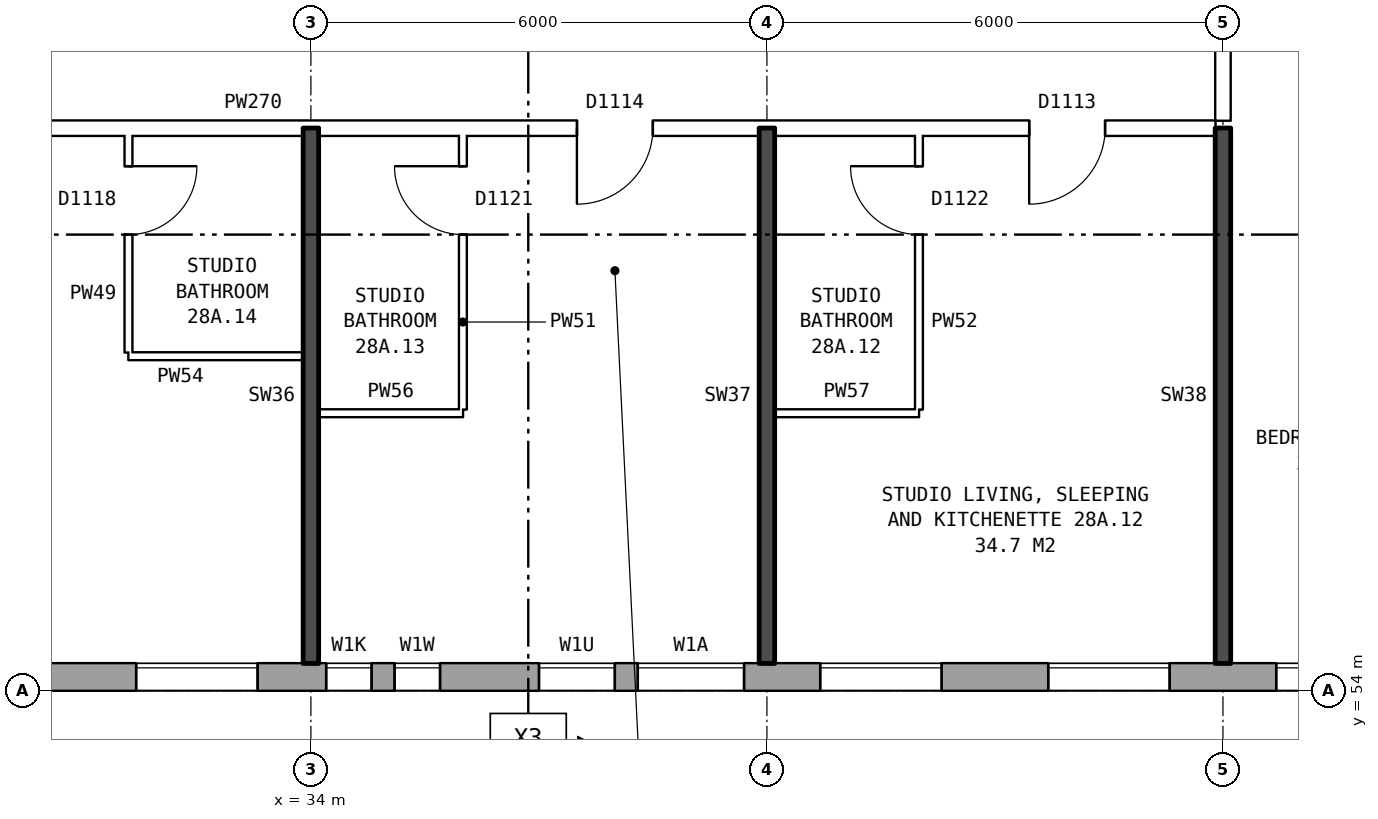
"""IFC4 building model, lengths in metres.
Left out: names, types, materials, properties, quantities, classifications, styles, units other than length and angle.
Written with IfcOpenShell. Run it as: python <this file> out.ifc"""

import sys

from ifc_helpers import new_model, si_unit, direction, frame, frame_2d, origin, place, context, subcontext, project, spatial, rectangle, extrude, element, fill, save


model = new_model("IFC4")
c1 = context("Model", 3, precision=1e-05, world=origin(), true_north=direction((0.0, 1.0)))
c2 = subcontext(c1, "Body", "Model", "MODEL_VIEW")
j1 = project(units=[si_unit("LENGTHUNIT", "METRE"), si_unit("PLANEANGLEUNIT", "RADIAN")], contexts=[c1])
p1 = place(None, origin())
s1 = spatial("IfcSite", under=j1, at=p1, CompositionType="ELEMENT")
p2 = place(p1, origin())
s2 = spatial("IfcBuilding", under=s1, at=p2, CompositionType="ELEMENT")
p3 = place(p2, frame((0.0, 0.0, 102.6)))
s3 = spatial("IfcBuildingStorey", under=s2, at=p3, CompositionType="ELEMENT", Elevation=102.6)
p4 = place(p3, frame((28.075, 54.18, 0.0), z_axis=(0.0, 0.0, 1.0), x_axis=(1.0, 0.0, 0.0)))
e1 = element("IfcWall", 1, at=p4, inside=s3, PredefinedType="STANDARD", context=c2, shape_type="SweptSolid", body=[
    extrude(rectangle(XDim=44.851, YDim=0.36, at=frame_2d((22.425, 0.0))), origin(), (0.0, 0.0, 1.0), 2.85),
])
p5 = place(p4, frame((0.625, 0.0, 0.8)))
e2 = element("IfcOpeningElement", 2, at=p5, cuts=e1, PredefinedType="OPENING", context=c2, shape_type="SweptSolid", body=[
    extrude(rectangle(XDim=1.6, YDim=1.8, at=frame_2d((0.8, 0.9))), frame((0.0, 0.19, 0.0), z_axis=(0.0, -1.0, 0.0), x_axis=(1.0, 0.0, 0.0)), (0.0, 0.0, 1.0), 0.38),
])
p6 = place(p4, frame((3.625, 0.0, 0.8)))
e3 = element("IfcOpeningElement", 3, at=p6, cuts=e1, PredefinedType="OPENING", context=c2, shape_type="SweptSolid", body=[
    extrude(rectangle(XDim=1.6, YDim=1.8, at=frame_2d((0.8, 0.9))), frame((0.0, 0.19, 0.0), z_axis=(0.0, -1.0, 0.0), x_axis=(1.0, 0.0, 0.0)), (0.0, 0.0, 1.0), 0.38),
])
p7 = place(p4, frame((6.125, 0.0, 1.0)))
e4 = element("IfcOpeningElement", 4, at=p7, cuts=e1, PredefinedType="OPENING", context=c2, shape_type="SweptSolid", body=[
    extrude(rectangle(XDim=0.6, YDim=1.5, at=frame_2d((0.3, 0.75))), frame((0.0, 0.19, 0.0), z_axis=(0.0, -1.0, 0.0), x_axis=(1.0, 0.0, 0.0)), (0.0, 0.0, 1.0), 0.38),
])
p8 = place(p4, frame((7.025, 0.0, 1.7)))
e5 = element("IfcOpeningElement", 5, at=p8, cuts=e1, PredefinedType="OPENING", context=c2, shape_type="SweptSolid", body=[
    extrude(rectangle(XDim=0.6, YDim=0.9, at=frame_2d((0.3, 0.45))), frame((0.0, 0.19, 0.0), z_axis=(0.0, -1.0, 0.0), x_axis=(1.0, 0.0, 0.0)), (0.0, 0.0, 1.0), 0.38),
])
p9 = place(p4, frame((12.625, 0.0, 0.8)))
e6 = element("IfcOpeningElement", 6, at=p9, cuts=e1, PredefinedType="OPENING", context=c2, shape_type="SweptSolid", body=[
    extrude(rectangle(XDim=1.6, YDim=1.8, at=frame_2d((0.8, 0.9))), frame((0.0, 0.19, 0.0), z_axis=(0.0, -1.0, 0.0), x_axis=(1.0, 0.0, 0.0)), (0.0, 0.0, 1.0), 0.38),
])
p10 = place(p4, frame((15.625, 0.0, 0.8)))
e7 = element("IfcOpeningElement", 7, at=p10, cuts=e1, PredefinedType="OPENING", context=c2, shape_type="SweptSolid", body=[
    extrude(rectangle(XDim=1.6, YDim=1.8, at=frame_2d((0.8, 0.9))), frame((0.0, 0.19, 0.0), z_axis=(0.0, -1.0, 0.0), x_axis=(1.0, 0.0, 0.0)), (0.0, 0.0, 1.0), 0.38),
])
p11 = place(p4, frame((18.625, 0.0, 0.8)))
e8 = element("IfcOpeningElement", 8, at=p11, cuts=e1, PredefinedType="OPENING", context=c2, shape_type="SweptSolid", body=[
    extrude(rectangle(XDim=1.6, YDim=1.8, at=frame_2d((0.8, 0.9))), frame((0.0, 0.19, 0.0), z_axis=(0.0, -1.0, 0.0), x_axis=(1.0, 0.0, 0.0)), (0.0, 0.0, 1.0), 0.38),
])
p12 = place(p4, frame((21.625, 0.0, 0.8)))
e9 = element("IfcOpeningElement", 9, at=p12, cuts=e1, PredefinedType="OPENING", context=c2, shape_type="SweptSolid", body=[
    extrude(rectangle(XDim=1.6, YDim=1.8, at=frame_2d((0.8, 0.9))), frame((0.0, 0.19, 0.0), z_axis=(0.0, -1.0, 0.0), x_axis=(1.0, 0.0, 0.0)), (0.0, 0.0, 1.0), 0.38),
])
p13 = place(p4, frame((24.625, 0.0, 0.8)))
e10 = element("IfcOpeningElement", 10, at=p13, cuts=e1, PredefinedType="OPENING", context=c2, shape_type="SweptSolid", body=[
    extrude(rectangle(XDim=1.6, YDim=1.8, at=frame_2d((0.8, 0.9))), frame((0.0, 0.19, 0.0), z_axis=(0.0, -1.0, 0.0), x_axis=(1.0, 0.0, 0.0)), (0.0, 0.0, 1.0), 0.38),
])
p14 = place(p4, frame((27.625, 0.0, 0.8)))
e11 = element("IfcOpeningElement", 11, at=p14, cuts=e1, PredefinedType="OPENING", context=c2, shape_type="SweptSolid", body=[
    extrude(rectangle(XDim=1.6, YDim=1.8, at=frame_2d((0.8, 0.9))), frame((0.0, 0.19, 0.0), z_axis=(0.0, -1.0, 0.0), x_axis=(1.0, 0.0, 0.0)), (0.0, 0.0, 1.0), 0.38),
])
p15 = place(p4, frame((30.625, 0.0, 0.8)))
e12 = element("IfcOpeningElement", 12, at=p15, cuts=e1, PredefinedType="OPENING", context=c2, shape_type="SweptSolid", body=[
    extrude(rectangle(XDim=1.6, YDim=1.8, at=frame_2d((0.8, 0.9))), frame((0.0, 0.19, 0.0), z_axis=(0.0, -1.0, 0.0), x_axis=(1.0, 0.0, 0.0)), (0.0, 0.0, 1.0), 0.38),
])
p16 = place(p4, frame((33.075, 0.0, 0.8)))
e13 = element("IfcOpeningElement", 13, at=p16, cuts=e1, PredefinedType="OPENING", context=c2, shape_type="SweptSolid", body=[
    extrude(rectangle(XDim=1.6, YDim=1.8, at=frame_2d((0.8, 0.9))), frame((0.0, 0.19, 0.0), z_axis=(0.0, -1.0, 0.0), x_axis=(1.0, 0.0, 0.0)), (0.0, 0.0, 1.0), 0.38),
])
p17 = place(p4, frame((37.175, 0.0, 1.7)))
e14 = element("IfcOpeningElement", 14, at=p17, cuts=e1, PredefinedType="OPENING", context=c2, shape_type="SweptSolid", body=[
    extrude(rectangle(XDim=1.0, YDim=0.9, at=frame_2d((0.5, 0.45))), frame((0.0, 0.19, 0.0), z_axis=(0.0, -1.0, 0.0), x_axis=(1.0, 0.0, 0.0)), (0.0, 0.0, 1.0), 0.38),
])
p18 = place(p4, frame((39.625, 0.0, 0.8)))
e15 = element("IfcOpeningElement", 15, at=p18, cuts=e1, PredefinedType="OPENING", context=c2, shape_type="SweptSolid", body=[
    extrude(rectangle(XDim=1.6, YDim=1.8, at=frame_2d((0.8, 0.9))), frame((0.0, 0.19, 0.0), z_axis=(0.0, -1.0, 0.0), x_axis=(1.0, 0.0, 0.0)), (0.0, 0.0, 1.0), 0.38),
])
p19 = place(p4, frame((42.625, 0.0, 0.8)))
e16 = element("IfcOpeningElement", 16, at=p19, cuts=e1, PredefinedType="OPENING", context=c2, shape_type="SweptSolid", body=[
    extrude(rectangle(XDim=1.6, YDim=1.8, at=frame_2d((0.8, 0.9))), frame((0.0, 0.19, 0.0), z_axis=(0.0, -1.0, 0.0), x_axis=(1.0, 0.0, 0.0)), (0.0, 0.0, 1.0), 0.38),
])
p20 = place(p4, frame((8.925, 0.0, 0.8)))
e17 = element("IfcOpeningElement", 17, at=p20, cuts=e1, PredefinedType="OPENING", context=c2, shape_type="SweptSolid", body=[
    extrude(rectangle(XDim=1.0, YDim=0.9, at=frame_2d((0.5, 0.45))), frame((0.0, 0.19, 0.0), z_axis=(0.0, -1.0, 0.0), x_axis=(1.0, 0.0, 0.0)), (0.0, 0.0, 1.0), 0.38),
])
p21 = place(p4, frame((10.225, 0.0, 0.8)))
e18 = element("IfcOpeningElement", 18, at=p21, cuts=e1, PredefinedType="OPENING", context=c2, shape_type="SweptSolid", body=[
    extrude(rectangle(XDim=1.4, YDim=1.8, at=frame_2d((0.7, 0.9))), frame((0.0, 0.19, 0.0), z_axis=(0.0, -1.0, 0.0), x_axis=(1.0, 0.0, 0.0)), (0.0, 0.0, 1.0), 0.38),
])
p22 = place(p4, frame((34.975, 0.0, 0.8)))
e19 = element("IfcOpeningElement", 19, at=p22, cuts=e1, PredefinedType="OPENING", context=c2, shape_type="SweptSolid", body=[
    extrude(rectangle(XDim=0.6, YDim=0.9, at=frame_2d((0.3, 0.45))), frame((0.0, 0.19, 0.0), z_axis=(0.0, -1.0, 0.0), x_axis=(1.0, 0.0, 0.0)), (0.0, 0.0, 1.0), 0.38),
])
p23 = place(p4, frame((38.475, 0.0, 0.8)))
e20 = element("IfcOpeningElement", 20, at=p23, cuts=e1, PredefinedType="OPENING", context=c2, shape_type="SweptSolid", body=[
    extrude(rectangle(XDim=0.8, YDim=1.8, at=frame_2d((0.4, 0.9))), frame((0.0, 0.19, 0.0), z_axis=(0.0, -1.0, 0.0), x_axis=(1.0, 0.0, 0.0)), (0.0, 0.0, 1.0), 0.38),
])
for number, where, z_axis, x_axis in (
    (21, (34.1, 57.65, 0.0), (0.0, 0.0, 1.0), (1.0, 0.0, 0.0)),
    (22, (40.1, 57.65, 0.0), (0.0, 0.0, 1.0), (1.0, 0.0, 0.0)),
):
    element("IfcWall", number, at=place(p3, frame(where, z_axis=z_axis, x_axis=x_axis)), inside=s3, PredefinedType="PARTITIONING", context=c2, shape_type="SweptSolid", body=[
        extrude(rectangle(XDim=1.9, YDim=0.1, at=frame_2d((0.95, 0.0))), origin(), (0.0, 0.0, 1.0), 2.85),
    ])
p24 = place(p3, frame((31.6, 58.4, 0.0), z_axis=(0.0, 0.0, 1.0), x_axis=(1.0, 0.0, 0.0)))
e23 = element("IfcWall", 23, at=p24, inside=s3, PredefinedType="PARTITIONING", context=c2, shape_type="SweptSolid", body=[
    extrude(rectangle(XDim=2.3, YDim=0.1, at=frame_2d((1.15, 0.0))), origin(), (0.0, 0.0, 1.0), 2.85),
])
p25 = place(p3, frame((25.36, 61.4, 0.0), z_axis=(0.0, 0.0, 1.0), x_axis=(1.0, 0.0, 0.0)))
e24 = element("IfcWall", 24, at=p25, inside=s3, PredefinedType="PARTITIONING", context=c2, shape_type="SweptSolid", body=[
    extrude(rectangle(XDim=20.54, YDim=0.2, at=frame_2d((10.27, 0.0))), origin(), (0.0, 0.0, 1.0), 2.85),
])
p26 = place(p25, frame((18.09, 0.0, 0.0)))
e25 = element("IfcOpeningElement", 25, at=p26, cuts=e24, PredefinedType="OPENING", context=c2, shape_type="SweptSolid", body=[
    extrude(rectangle(XDim=1.0, YDim=2.1, at=frame_2d((0.5, 1.05))), frame((0.0, 0.11, 0.0), z_axis=(0.0, -1.0, 0.0), x_axis=(1.0, 0.0, 0.0)), (0.0, 0.0, 1.0), 0.22),
])
p27 = place(p25, frame((12.14, 0.0, 0.0)))
e26 = element("IfcOpeningElement", 26, at=p27, cuts=e24, PredefinedType="OPENING", context=c2, shape_type="SweptSolid", body=[
    extrude(rectangle(XDim=1.0, YDim=2.1, at=frame_2d((0.5, 1.05))), frame((0.0, 0.11, 0.0), z_axis=(0.0, -1.0, 0.0), x_axis=(1.0, 0.0, 0.0)), (0.0, 0.0, 1.0), 0.22),
])
p28 = place(p25, frame((2.62, 0.0, 0.0)))
e27 = element("IfcOpeningElement", 27, at=p28, cuts=e24, PredefinedType="OPENING", context=c2, shape_type="SweptSolid", body=[
    extrude(rectangle(XDim=1.0, YDim=2.1, at=frame_2d((0.5, 1.05))), frame((0.0, 0.11, 0.0), z_axis=(0.0, -1.0, 0.0), x_axis=(1.0, 0.0, 0.0)), (0.0, 0.0, 1.0), 0.22),
])
p29 = place(p3, frame((31.6, 58.45, 0.0), z_axis=(0.0, 0.0, 1.0), x_axis=(0.0, 1.0, 0.0)))
e28 = element("IfcWall", 28, at=p29, inside=s3, PredefinedType="PARTITIONING", context=c2, shape_type="SweptSolid", body=[
    extrude(rectangle(XDim=2.85, YDim=0.1, at=frame_2d((1.425, 0.0))), origin(), (0.0, 0.0, 1.0), 2.85),
])
p30 = place(p29, frame((1.55, 0.0, 0.0)))
e29 = element("IfcOpeningElement", 29, at=p30, cuts=e28, PredefinedType="OPENING", context=c2, shape_type="SweptSolid", body=[
    extrude(rectangle(XDim=0.9, YDim=2.1, at=frame_2d((0.45, 1.05))), frame((0.0, 0.06, 0.0), z_axis=(0.0, -1.0, 0.0), x_axis=(1.0, 0.0, 0.0)), (0.0, 0.0, 1.0), 0.12),
])
p31 = place(p3, frame((34.0, 54.36, 0.0), z_axis=(0.0, 0.0, 1.0), x_axis=(0.0, 1.0, 0.0)))
e30 = element("IfcWall", 30, at=p31, inside=s3, PredefinedType="SOLIDWALL", context=c2, shape_type="SweptSolid", body=[
    extrude(rectangle(XDim=7.04, YDim=0.2, at=frame_2d((3.52, 0.0))), origin(), (0.0, 0.0, 1.0), 2.85),
])
p32 = place(p3, frame((36.0, 57.7, 0.0), z_axis=(0.0, 0.0, 1.0), x_axis=(0.0, 1.0, 0.0)))
e31 = element("IfcWall", 31, at=p32, inside=s3, PredefinedType="PARTITIONING", context=c2, shape_type="SweptSolid", body=[
    extrude(rectangle(XDim=3.6, YDim=0.1, at=frame_2d((1.8, 0.0))), origin(), (0.0, 0.0, 1.0), 2.85),
])
p33 = place(p32, frame((2.3, 0.0, 0.0)))
e32 = element("IfcOpeningElement", 32, at=p33, cuts=e31, PredefinedType="OPENING", context=c2, shape_type="SweptSolid", body=[
    extrude(rectangle(XDim=0.9, YDim=2.1, at=frame_2d((0.45, 1.05))), frame((0.0, 0.06, 0.0), z_axis=(0.0, -1.0, 0.0), x_axis=(1.0, 0.0, 0.0)), (0.0, 0.0, 1.0), 0.12),
])
p34 = place(p3, frame((40.0, 54.36, 0.0), z_axis=(0.0, 0.0, 1.0), x_axis=(0.0, 1.0, 0.0)))
e33 = element("IfcWall", 33, at=p34, inside=s3, PredefinedType="SOLIDWALL", context=c2, shape_type="SweptSolid", body=[
    extrude(rectangle(XDim=7.04, YDim=0.2, at=frame_2d((3.52, 0.0))), origin(), (0.0, 0.0, 1.0), 2.85),
])
p35 = place(p3, frame((42.0, 57.7, 0.0), z_axis=(0.0, 0.0, 1.0), x_axis=(0.0, 1.0, 0.0)))
e34 = element("IfcWall", 34, at=p35, inside=s3, PredefinedType="PARTITIONING", context=c2, shape_type="SweptSolid", body=[
    extrude(rectangle(XDim=3.6, YDim=0.1, at=frame_2d((1.8, 0.0))), origin(), (0.0, 0.0, 1.0), 2.85),
])
p36 = place(p35, frame((2.3, 0.0, 0.0)))
e35 = element("IfcOpeningElement", 35, at=p36, cuts=e34, PredefinedType="OPENING", context=c2, shape_type="SweptSolid", body=[
    extrude(rectangle(XDim=0.9, YDim=2.1, at=frame_2d((0.45, 1.05))), frame((0.0, 0.06, 0.0), z_axis=(0.0, -1.0, 0.0), x_axis=(1.0, 0.0, 0.0)), (0.0, 0.0, 1.0), 0.12),
])
p37 = place(p3, frame((46.0, 54.36, 0.0), z_axis=(0.0, 0.0, 1.0), x_axis=(0.0, 1.0, 0.0)))
e36 = element("IfcWall", 36, at=p37, inside=s3, PredefinedType="SOLIDWALL", context=c2, shape_type="SweptSolid", body=[
    extrude(rectangle(XDim=7.04, YDim=0.2, at=frame_2d((3.52, 0.0))), origin(), (0.0, 0.0, 1.0), 2.85),
])
p38 = place(p3, frame((46.0, 61.5, 0.0), z_axis=(0.0, 0.0, 1.0), x_axis=(0.0, 1.0, 0.0)))
e37 = element("IfcWall", 37, at=p38, inside=s3, PredefinedType="PARTITIONING", context=c2, shape_type="SweptSolid", body=[
    extrude(rectangle(XDim=2.2, YDim=0.2, at=frame_2d((1.1, 0.0))), origin(), (0.0, 0.0, 1.0), 2.85),
])
p39 = place(p6, origin())
e38 = element("IfcWindow", 38, at=p39, inside=s3, PartitioningType="SINGLE_PANEL", PredefinedType="WINDOW", context=c2, shape_type="SweptSolid", body=[
    extrude(rectangle(XDim=1.6, YDim=1.8, at=frame_2d((0.8, 0.9))), frame((0.0, 0.15, 0.0), z_axis=(0.0, -1.0, 0.0), x_axis=(1.0, 0.0, 0.0)), (0.0, 0.0, 1.0), 0.06),
])
fill(e3, e38)
p40 = place(p7, origin())
e39 = element("IfcWindow", 39, at=p40, inside=s3, PartitioningType="SINGLE_PANEL", PredefinedType="WINDOW", context=c2, shape_type="SweptSolid", body=[
    extrude(rectangle(XDim=0.6, YDim=1.5, at=frame_2d((0.3, 0.75))), frame((0.0, 0.15, 0.0), z_axis=(0.0, -1.0, 0.0), x_axis=(1.0, 0.0, 0.0)), (0.0, 0.0, 1.0), 0.06),
])
fill(e4, e39)
p41 = place(p8, origin())
e40 = element("IfcWindow", 40, at=p41, inside=s3, PartitioningType="SINGLE_PANEL", PredefinedType="WINDOW", context=c2, shape_type="SweptSolid", body=[
    extrude(rectangle(XDim=0.6, YDim=0.9, at=frame_2d((0.3, 0.45))), frame((0.0, 0.15, 0.0), z_axis=(0.0, -1.0, 0.0), x_axis=(1.0, 0.0, 0.0)), (0.0, 0.0, 1.0), 0.06),
])
fill(e5, e40)
p42 = place(p9, origin())
e41 = element("IfcWindow", 41, at=p42, inside=s3, PartitioningType="SINGLE_PANEL", PredefinedType="WINDOW", context=c2, shape_type="SweptSolid", body=[
    extrude(rectangle(XDim=1.6, YDim=1.8, at=frame_2d((0.8, 0.9))), frame((0.0, 0.15, 0.0), z_axis=(0.0, -1.0, 0.0), x_axis=(1.0, 0.0, 0.0)), (0.0, 0.0, 1.0), 0.06),
])
fill(e6, e41)
p43 = place(p10, origin())
e42 = element("IfcWindow", 42, at=p43, inside=s3, PartitioningType="SINGLE_PANEL", PredefinedType="WINDOW", context=c2, shape_type="SweptSolid", body=[
    extrude(rectangle(XDim=1.6, YDim=1.8, at=frame_2d((0.8, 0.9))), frame((0.0, 0.15, 0.0), z_axis=(0.0, -1.0, 0.0), x_axis=(1.0, 0.0, 0.0)), (0.0, 0.0, 1.0), 0.06),
])
fill(e7, e42)
p44 = place(p11, origin())
e43 = element("IfcWindow", 43, at=p44, inside=s3, PartitioningType="SINGLE_PANEL", PredefinedType="WINDOW", context=c2, shape_type="SweptSolid", body=[
    extrude(rectangle(XDim=1.6, YDim=1.8, at=frame_2d((0.8, 0.9))), frame((0.0, 0.15, 0.0), z_axis=(0.0, -1.0, 0.0), x_axis=(1.0, 0.0, 0.0)), (0.0, 0.0, 1.0), 0.06),
])
fill(e8, e43)
p45 = place(p26, frame((1.0, 0.0, 0.0), z_axis=(0.0, 0.0, 1.0), x_axis=(-1.0, 0.0, 0.0)))
e44 = element("IfcDoor", 44, at=p45, inside=s3, OperationType="SINGLE_SWING_RIGHT", PredefinedType="DOOR", context=c2, shape_type="SweptSolid", body=[
    extrude(rectangle(XDim=1.0, YDim=2.1, at=frame_2d((0.5, 1.05))), frame((0.0, 0.025, 0.0), z_axis=(0.0, -1.0, 0.0), x_axis=(1.0, 0.0, 0.0)), (0.0, 0.0, 1.0), 0.05),
])
fill(e25, e44)
p46 = place(p36, origin())
e45 = element("IfcDoor", 45, at=p46, inside=s3, OperationType="SINGLE_SWING_RIGHT", PredefinedType="DOOR", context=c2, shape_type="SweptSolid", body=[
    extrude(rectangle(XDim=0.9, YDim=2.1, at=frame_2d((0.45, 1.05))), frame((0.0, 0.025, 0.0), z_axis=(0.0, -1.0, 0.0), x_axis=(1.0, 0.0, 0.0)), (0.0, 0.0, 1.0), 0.05),
])
fill(e35, e45)
p47 = place(p27, frame((1.0, 0.0, 0.0), z_axis=(0.0, 0.0, 1.0), x_axis=(-1.0, 0.0, 0.0)))
e46 = element("IfcDoor", 46, at=p47, inside=s3, OperationType="SINGLE_SWING_RIGHT", PredefinedType="DOOR", context=c2, shape_type="SweptSolid", body=[
    extrude(rectangle(XDim=1.0, YDim=2.1, at=frame_2d((0.5, 1.05))), frame((0.0, 0.025, 0.0), z_axis=(0.0, -1.0, 0.0), x_axis=(1.0, 0.0, 0.0)), (0.0, 0.0, 1.0), 0.05),
])
fill(e26, e46)
p48 = place(p33, origin())
e47 = element("IfcDoor", 47, at=p48, inside=s3, OperationType="SINGLE_SWING_RIGHT", PredefinedType="DOOR", context=c2, shape_type="SweptSolid", body=[
    extrude(rectangle(XDim=0.9, YDim=2.1, at=frame_2d((0.45, 1.05))), frame((0.0, 0.025, 0.0), z_axis=(0.0, -1.0, 0.0), x_axis=(1.0, 0.0, 0.0)), (0.0, 0.0, 1.0), 0.05),
])
fill(e32, e47)
p49 = place(p30, frame((0.9, 0.0, 0.0), z_axis=(0.0, 0.0, 1.0), x_axis=(-1.0, 0.0, 0.0)))
e48 = element("IfcDoor", 48, at=p49, inside=s3, OperationType="SINGLE_SWING_LEFT", PredefinedType="DOOR", context=c2, shape_type="SweptSolid", body=[
    extrude(rectangle(XDim=0.9, YDim=2.1, at=frame_2d((0.45, 1.05))), frame((0.0, 0.025, 0.0), z_axis=(0.0, -1.0, 0.0), x_axis=(1.0, 0.0, 0.0)), (0.0, 0.0, 1.0), 0.05),
])
fill(e29, e48)
p50 = place(p20, origin())
e49 = element("IfcWindow", 49, at=p50, inside=s3, PartitioningType="SINGLE_PANEL", PredefinedType="WINDOW", context=c2, shape_type="SweptSolid", body=[
    extrude(rectangle(XDim=1.0, YDim=0.9, at=frame_2d((0.5, 0.45))), frame((0.0, 0.15, 0.0), z_axis=(0.0, -1.0, 0.0), x_axis=(1.0, 0.0, 0.0)), (0.0, 0.0, 1.0), 0.06),
])
fill(e17, e49)
p51 = place(p21, origin())
e50 = element("IfcWindow", 50, at=p51, inside=s3, PartitioningType="SINGLE_PANEL", PredefinedType="WINDOW", context=c2, shape_type="SweptSolid", body=[
    extrude(rectangle(XDim=1.4, YDim=1.8, at=frame_2d((0.7, 0.9))), frame((0.0, 0.15, 0.0), z_axis=(0.0, -1.0, 0.0), x_axis=(1.0, 0.0, 0.0)), (0.0, 0.0, 1.0), 0.06),
])
fill(e18, e50)
save(model, sys.argv[1])
